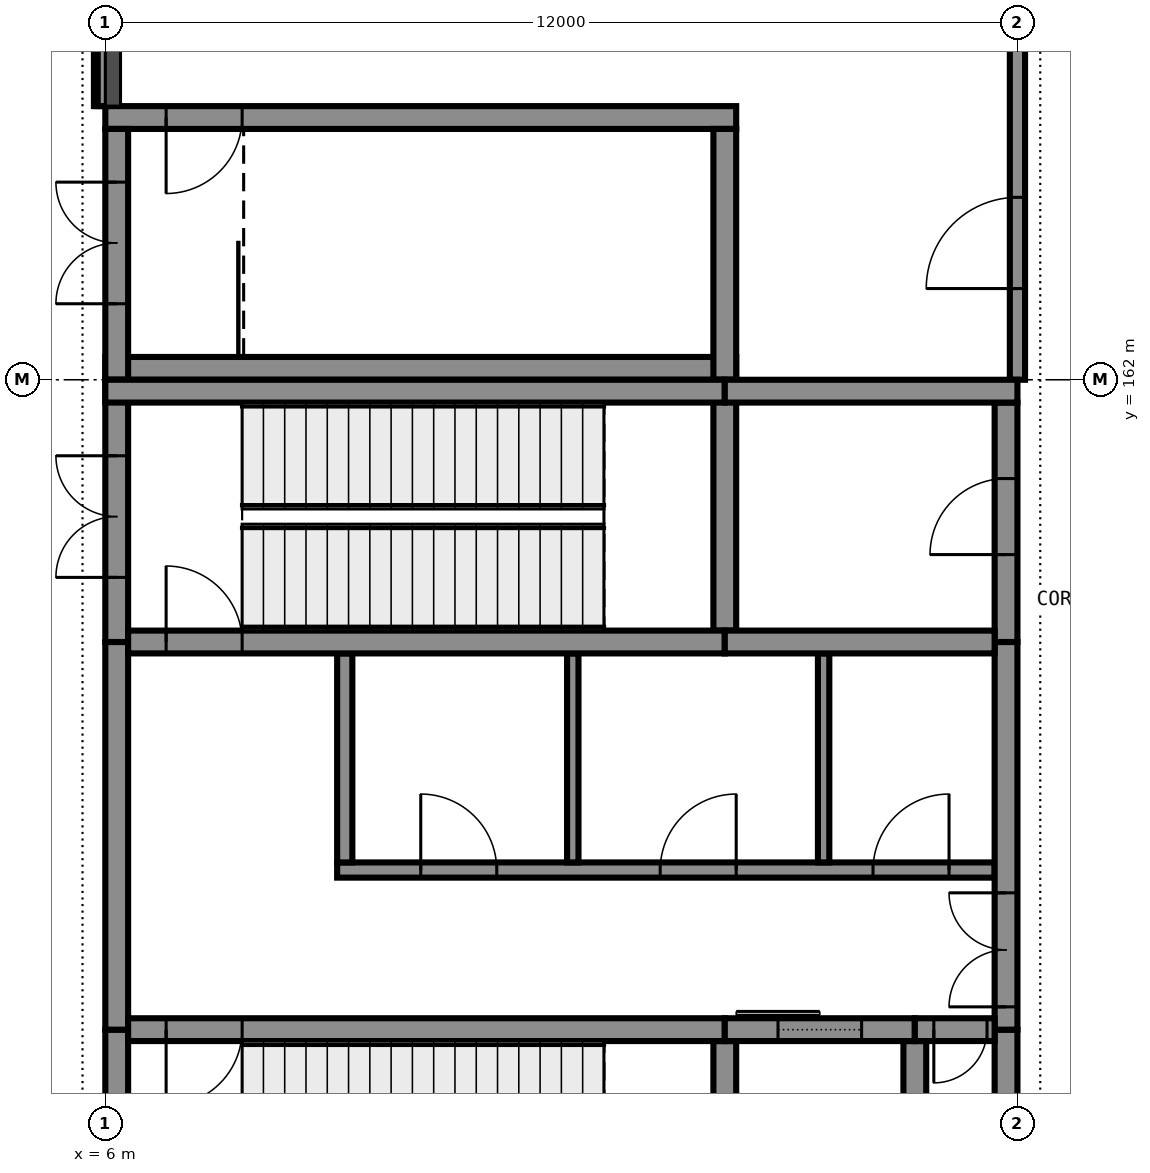
"""IFC4 building model, lengths in metres.
Left out: names, types, materials, properties, quantities, classifications, styles, units other than length and angle.
Written with IfcOpenShell. Run it as: python <this file> out.ifc"""

import sys

from ifc_helpers import new_model, si_unit, direction, frame, frame_2d, origin, place, context, subcontext, project, spatial, rectangle, extrude, element, fill, save


model = new_model("IFC4")
c1 = context("Model", 3, precision=1e-05, world=origin(), true_north=direction((0.0, 1.0)))
c2 = subcontext(c1, "Body", "Model", "MODEL_VIEW")
j1 = project(units=[si_unit("LENGTHUNIT", "METRE"), si_unit("PLANEANGLEUNIT", "RADIAN")], contexts=[c1])
p1 = place(None, origin())
s1 = spatial("IfcSite", under=j1, at=p1, CompositionType="ELEMENT")
p2 = place(p1, origin())
s2 = spatial("IfcBuilding", under=s1, at=p2, CompositionType="ELEMENT")
p3 = place(p2, origin())
s3 = spatial("IfcBuildingStorey", under=s2, at=p3, CompositionType="ELEMENT", Elevation=0.0)
p4 = place(p3, frame((6.0, 162.15, 0.0), z_axis=(0.0, 0.0, 1.0), x_axis=(1.0, 0.0, 0.0)))
e1 = element("IfcWall", 1, at=p4, inside=s3, PredefinedType="SHEAR", context=c2, shape_type="SweptSolid", body=[
    extrude(rectangle(XDim=8.3, YDim=0.3, at=frame_2d((4.15, 0.0))), origin(), (0.0, 0.0, 1.0), 5.75),
])
p5 = place(p3, frame((6.0, 165.45, 0.0), z_axis=(0.0, 0.0, 1.0), x_axis=(1.0, 0.0, 0.0)))
e2 = element("IfcWall", 2, at=p5, inside=s3, PredefinedType="SHEAR", context=c2, shape_type="SweptSolid", body=[
    extrude(rectangle(XDim=8.3, YDim=0.3, at=frame_2d((4.15, 0.0))), origin(), (0.0, 0.0, 1.0), 5.75),
])
p6 = place(p5, frame((0.8, 0.0, 0.0)))
e3 = element("IfcOpeningElement", 3, at=p6, cuts=e2, PredefinedType="OPENING", context=c2, shape_type="SweptSolid", body=[
    extrude(rectangle(XDim=1.0, YDim=2.1, at=frame_2d((0.5, 1.05))), frame((0.0, 0.16, 0.0), z_axis=(0.0, -1.0, 0.0), x_axis=(1.0, 0.0, 0.0)), (0.0, 0.0, 1.0), 0.32),
])
p7 = place(p3, frame((6.15, 162.0, 0.0), z_axis=(0.0, 0.0, 1.0), x_axis=(0.0, 1.0, 0.0)))
e4 = element("IfcWall", 4, at=p7, inside=s3, PredefinedType="SHEAR", context=c2, shape_type="SweptSolid", body=[
    extrude(rectangle(XDim=3.3, YDim=0.3, at=frame_2d((1.65, 0.0))), origin(), (0.0, 0.0, 1.0), 5.75),
])
p8 = place(p7, frame((1.0, 0.0, 0.0)))
e5 = element("IfcOpeningElement", 5, at=p8, cuts=e4, PredefinedType="OPENING", context=c2, shape_type="SweptSolid", body=[
    extrude(rectangle(XDim=1.6, YDim=2.1, at=frame_2d((0.8, 1.05))), frame((0.0, 0.16, 0.0), z_axis=(0.0, -1.0, 0.0), x_axis=(1.0, 0.0, 0.0)), (0.0, 0.0, 1.0), 0.32),
])
p9 = place(p3, frame((14.15, 162.0, 0.0), z_axis=(0.0, 0.0, 1.0), x_axis=(0.0, 1.0, 0.0)))
e6 = element("IfcWall", 6, at=p9, inside=s3, PredefinedType="SHEAR", context=c2, shape_type="SweptSolid", body=[
    extrude(rectangle(XDim=3.3, YDim=0.3, at=frame_2d((1.65, 0.0))), origin(), (0.0, 0.0, 1.0), 5.75),
])
p10 = place(p3, frame((6.0, 161.85, 0.0), z_axis=(0.0, 0.0, 1.0), x_axis=(1.0, 0.0, 0.0)))
e7 = element("IfcWall", 7, at=p10, inside=s3, PredefinedType="SHEAR", context=c2, shape_type="SweptSolid", body=[
    extrude(rectangle(XDim=8.15, YDim=0.3, at=frame_2d((4.075, 0.0))), origin(), (0.0, 0.0, 1.0), 5.75),
])
p11 = place(p3, frame((14.15, 161.85, 0.0), z_axis=(0.0, 0.0, 1.0), x_axis=(1.0, 0.0, 0.0)))
e8 = element("IfcWall", 8, at=p11, inside=s3, PredefinedType="SHEAR", context=c2, shape_type="SweptSolid", body=[
    extrude(rectangle(XDim=3.85, YDim=0.3, at=frame_2d((1.925, 0.0))), origin(), (0.0, 0.0, 1.0), 5.75),
])
p12 = place(p3, frame((6.3, 153.45, 0.0), z_axis=(0.0, 0.0, 1.0), x_axis=(1.0, 0.0, 0.0)))
e9 = element("IfcWall", 9, at=p12, inside=s3, PredefinedType="SHEAR", context=c2, shape_type="SweptSolid", body=[
    extrude(rectangle(XDim=7.85, YDim=0.3, at=frame_2d((3.925, 0.0))), origin(), (0.0, 0.0, 1.0), 5.75),
])
p13 = place(p12, frame((0.5, 0.0, 0.0)))
e10 = element("IfcOpeningElement", 10, at=p13, cuts=e9, PredefinedType="OPENING", context=c2, shape_type="SweptSolid", body=[
    extrude(rectangle(XDim=1.0, YDim=2.1, at=frame_2d((0.5, 1.05))), frame((0.0, 0.16, 0.0), z_axis=(0.0, -1.0, 0.0), x_axis=(1.0, 0.0, 0.0)), (0.0, 0.0, 1.0), 0.32),
])
p14 = place(p3, frame((14.15, 153.45, 0.0), z_axis=(0.0, 0.0, 1.0), x_axis=(1.0, 0.0, 0.0)))
e11 = element("IfcWall", 11, at=p14, inside=s3, PredefinedType="SHEAR", context=c2, shape_type="SweptSolid", body=[
    extrude(rectangle(XDim=2.5, YDim=0.3, at=frame_2d((1.25, 0.0))), origin(), (0.0, 0.0, 1.0), 5.75),
])
p15 = place(p14, frame((0.7, 0.0, 0.0)))
e12 = element("IfcOpeningElement", 12, at=p15, cuts=e11, PredefinedType="OPENING", context=c2, shape_type="SweptSolid", body=[
    extrude(rectangle(XDim=1.1, YDim=2.1, at=frame_2d((0.55, 1.05))), frame((0.0, 0.16, 0.0), z_axis=(0.0, -1.0, 0.0), x_axis=(1.0, 0.0, 0.0)), (0.0, 0.0, 1.0), 0.32),
])
p16 = place(p3, frame((16.65, 153.45, 0.0), z_axis=(0.0, 0.0, 1.0), x_axis=(1.0, 0.0, 0.0)))
e13 = element("IfcWall", 13, at=p16, inside=s3, PredefinedType="SHEAR", context=c2, shape_type="SweptSolid", body=[
    extrude(rectangle(XDim=1.05, YDim=0.3, at=frame_2d((0.525, 0.0))), origin(), (0.0, 0.0, 1.0), 5.75),
])
p17 = place(p16, frame((0.25, 0.0, 0.0)))
e14 = element("IfcOpeningElement", 14, at=p17, cuts=e13, PredefinedType="OPENING", context=c2, shape_type="SweptSolid", body=[
    extrude(rectangle(XDim=0.7, YDim=2.1, at=frame_2d((0.35, 1.05))), frame((0.0, 0.16, 0.0), z_axis=(0.0, -1.0, 0.0), x_axis=(1.0, 0.0, 0.0)), (0.0, 0.0, 1.0), 0.32),
])
p18 = place(p3, frame((6.3, 158.55, 0.0), z_axis=(0.0, 0.0, 1.0), x_axis=(1.0, 0.0, 0.0)))
e15 = element("IfcWall", 15, at=p18, inside=s3, PredefinedType="SHEAR", context=c2, shape_type="SweptSolid", body=[
    extrude(rectangle(XDim=7.85, YDim=0.3, at=frame_2d((3.925, 0.0))), origin(), (0.0, 0.0, 1.0), 5.75),
])
p19 = place(p18, frame((0.5, 0.0, 0.0)))
e16 = element("IfcOpeningElement", 16, at=p19, cuts=e15, PredefinedType="OPENING", context=c2, shape_type="SweptSolid", body=[
    extrude(rectangle(XDim=1.0, YDim=2.1, at=frame_2d((0.5, 1.05))), frame((0.0, 0.16, 0.0), z_axis=(0.0, -1.0, 0.0), x_axis=(1.0, 0.0, 0.0)), (0.0, 0.0, 1.0), 0.32),
])
p20 = place(p3, frame((14.15, 158.55, 0.0), z_axis=(0.0, 0.0, 1.0), x_axis=(1.0, 0.0, 0.0)))
e17 = element("IfcWall", 17, at=p20, inside=s3, PredefinedType="SHEAR", context=c2, shape_type="SweptSolid", body=[
    extrude(rectangle(XDim=3.55, YDim=0.3, at=frame_2d((1.775, 0.0))), origin(), (0.0, 0.0, 1.0), 5.75),
])
p21 = place(p3, frame((6.15, 150.3, 0.0), z_axis=(0.0, 0.0, 1.0), x_axis=(0.0, 1.0, 0.0)))
e18 = element("IfcWall", 18, at=p21, inside=s3, PredefinedType="SHEAR", context=c2, shape_type="SweptSolid", body=[
    extrude(rectangle(XDim=3.15, YDim=0.3, at=frame_2d((1.575, 0.0))), origin(), (0.0, 0.0, 1.0), 5.75),
])
p22 = place(p21, frame((0.65, 0.0, 0.0)))
e19 = element("IfcOpeningElement", 19, at=p22, cuts=e18, PredefinedType="OPENING", context=c2, shape_type="SweptSolid", body=[
    extrude(rectangle(XDim=1.6, YDim=2.1, at=frame_2d((0.8, 1.05))), frame((0.0, 0.16, 0.0), z_axis=(0.0, -1.0, 0.0), x_axis=(1.0, 0.0, 0.0)), (0.0, 0.0, 1.0), 0.32),
])
p23 = place(p3, frame((6.15, 153.45, 0.0), z_axis=(0.0, 0.0, 1.0), x_axis=(0.0, 1.0, 0.0)))
e20 = element("IfcWall", 20, at=p23, inside=s3, PredefinedType="SHEAR", context=c2, shape_type="SweptSolid", body=[
    extrude(rectangle(XDim=5.1, YDim=0.3, at=frame_2d((2.55, 0.0))), origin(), (0.0, 0.0, 1.0), 5.75),
])
p24 = place(p3, frame((6.15, 158.55, 0.0), z_axis=(0.0, 0.0, 1.0), x_axis=(0.0, 1.0, 0.0)))
e21 = element("IfcWall", 21, at=p24, inside=s3, PredefinedType="SHEAR", context=c2, shape_type="SweptSolid", body=[
    extrude(rectangle(XDim=3.45, YDim=0.3, at=frame_2d((1.725, 0.0))), origin(), (0.0, 0.0, 1.0), 5.75),
])
p25 = place(p24, frame((0.85, 0.0, 0.0)))
e22 = element("IfcOpeningElement", 22, at=p25, cuts=e21, PredefinedType="OPENING", context=c2, shape_type="SweptSolid", body=[
    extrude(rectangle(XDim=1.6, YDim=2.1, at=frame_2d((0.8, 1.05))), frame((0.0, 0.16, 0.0), z_axis=(0.0, -1.0, 0.0), x_axis=(1.0, 0.0, 0.0)), (0.0, 0.0, 1.0), 0.32),
])
p26 = place(p3, frame((17.85, 150.3, 0.0), z_axis=(0.0, 0.0, 1.0), x_axis=(0.0, 1.0, 0.0)))
e23 = element("IfcWall", 23, at=p26, inside=s3, PredefinedType="SHEAR", context=c2, shape_type="SweptSolid", body=[
    extrude(rectangle(XDim=3.15, YDim=0.3, at=frame_2d((1.575, 0.0))), origin(), (0.0, 0.0, 1.0), 5.75),
])
p27 = place(p3, frame((17.85, 153.45, 0.0), z_axis=(0.0, 0.0, 1.0), x_axis=(0.0, 1.0, 0.0)))
e24 = element("IfcWall", 24, at=p27, inside=s3, PredefinedType="SHEAR", context=c2, shape_type="SweptSolid", body=[
    extrude(rectangle(XDim=5.1, YDim=0.3, at=frame_2d((2.55, 0.0))), origin(), (0.0, 0.0, 1.0), 5.75),
])
p28 = place(p27, frame((0.3, 0.0, 0.0)))
e25 = element("IfcOpeningElement", 25, at=p28, cuts=e24, PredefinedType="OPENING", context=c2, shape_type="SweptSolid", body=[
    extrude(rectangle(XDim=1.5, YDim=2.1, at=frame_2d((0.75, 1.05))), frame((0.0, 0.16, 0.0), z_axis=(0.0, -1.0, 0.0), x_axis=(1.0, 0.0, 0.0)), (0.0, 0.0, 1.0), 0.32),
])
p29 = place(p3, frame((17.85, 158.55, 0.0), z_axis=(0.0, 0.0, 1.0), x_axis=(0.0, 1.0, 0.0)))
e26 = element("IfcWall", 26, at=p29, inside=s3, PredefinedType="SHEAR", context=c2, shape_type="SweptSolid", body=[
    extrude(rectangle(XDim=3.15, YDim=0.3, at=frame_2d((1.575, 0.0))), origin(), (0.0, 0.0, 1.0), 5.75),
])
p30 = place(p29, frame((1.15, 0.0, 0.0)))
e27 = element("IfcOpeningElement", 27, at=p30, cuts=e26, PredefinedType="OPENING", context=c2, shape_type="SweptSolid", body=[
    extrude(rectangle(XDim=1.0, YDim=2.1, at=frame_2d((0.5, 1.05))), frame((0.0, 0.16, 0.0), z_axis=(0.0, -1.0, 0.0), x_axis=(1.0, 0.0, 0.0)), (0.0, 0.0, 1.0), 0.32),
])
p31 = place(p3, frame((14.15, 150.3, 0.0), z_axis=(0.0, 0.0, 1.0), x_axis=(0.0, 1.0, 0.0)))
e28 = element("IfcWall", 28, at=p31, inside=s3, PredefinedType="SHEAR", context=c2, shape_type="SweptSolid", body=[
    extrude(rectangle(XDim=3.0, YDim=0.3, at=frame_2d((1.5, 0.0))), origin(), (0.0, 0.0, 1.0), 5.75),
])
p32 = place(p3, frame((14.15, 158.7, 0.0), z_axis=(0.0, 0.0, 1.0), x_axis=(0.0, 1.0, 0.0)))
e29 = element("IfcWall", 29, at=p32, inside=s3, PredefinedType="SHEAR", context=c2, shape_type="SweptSolid", body=[
    extrude(rectangle(XDim=3.3, YDim=0.3, at=frame_2d((1.65, 0.0))), origin(), (0.0, 0.0, 1.0), 5.75),
])
p33 = place(p3, frame((16.65, 150.3, 0.0), z_axis=(0.0, 0.0, 1.0), x_axis=(0.0, 1.0, 0.0)))
e30 = element("IfcWall", 30, at=p33, inside=s3, PredefinedType="SHEAR", context=c2, shape_type="SweptSolid", body=[
    extrude(rectangle(XDim=3.0, YDim=0.3, at=frame_2d((1.5, 0.0))), origin(), (0.0, 0.0, 1.0), 5.75),
])
p34 = place(p3, frame((5.925, 173.5, 5.75), z_axis=(0.0, 0.0, 1.0), x_axis=(0.0, -1.0, 0.0)))
e31 = element("IfcWall", 31, at=p34, inside=s3, PredefinedType="STANDARD", context=c2, shape_type="SweptSolid", body=[
    extrude(rectangle(XDim=7.9, YDim=0.15, at=frame_2d((3.95, 0.0))), origin(), (0.0, 0.0, 1.0), 0.25),
])
p35 = place(p3, frame((9.05, 155.55, 0.0), z_axis=(0.0, 0.0, 1.0), x_axis=(1.0, 0.0, 0.0)))
e32 = element("IfcWall", 32, at=p35, inside=s3, PredefinedType="PARTITIONING", context=c2, shape_type="SweptSolid", body=[
    extrude(rectangle(XDim=8.65, YDim=0.2, at=frame_2d((4.325, 0.0))), origin(), (0.0, 0.0, 1.0), 5.75),
])
p36 = place(p35, frame((1.1, 0.0, 0.0)))
e33 = element("IfcOpeningElement", 33, at=p36, cuts=e32, PredefinedType="OPENING", context=c2, shape_type="SweptSolid", body=[
    extrude(rectangle(XDim=1.0, YDim=2.1, at=frame_2d((0.5, 1.05))), frame((0.0, 0.11, 0.0), z_axis=(0.0, -1.0, 0.0), x_axis=(1.0, 0.0, 0.0)), (0.0, 0.0, 1.0), 0.22),
])
p37 = place(p35, frame((4.25, 0.0, 0.0)))
e34 = element("IfcOpeningElement", 34, at=p37, cuts=e32, PredefinedType="OPENING", context=c2, shape_type="SweptSolid", body=[
    extrude(rectangle(XDim=1.0, YDim=2.1, at=frame_2d((0.5, 1.05))), frame((0.0, 0.11, 0.0), z_axis=(0.0, -1.0, 0.0), x_axis=(1.0, 0.0, 0.0)), (0.0, 0.0, 1.0), 0.22),
])
p38 = place(p35, frame((7.05, 0.0, 0.0)))
e35 = element("IfcOpeningElement", 35, at=p38, cuts=e32, PredefinedType="OPENING", context=c2, shape_type="SweptSolid", body=[
    extrude(rectangle(XDim=1.0, YDim=2.1, at=frame_2d((0.5, 1.05))), frame((0.0, 0.11, 0.0), z_axis=(0.0, -1.0, 0.0), x_axis=(1.0, 0.0, 0.0)), (0.0, 0.0, 1.0), 0.22),
])
p39 = place(p3, frame((6.0, 165.6, 0.0), z_axis=(0.0, 0.0, 1.0), x_axis=(0.0, 1.0, 0.0)))
e36 = element("IfcWall", 36, at=p39, inside=s3, PredefinedType="PARTITIONING", context=c2, shape_type="SweptSolid", body=[
    extrude(rectangle(XDim=2.3, YDim=0.2, at=frame_2d((1.15, 0.0))), origin(), (0.0, 0.0, 1.0), 4.75),
])
p40 = place(p3, frame((9.15, 155.65, 0.0), z_axis=(0.0, 0.0, 1.0), x_axis=(0.0, 1.0, 0.0)))
e37 = element("IfcWall", 37, at=p40, inside=s3, PredefinedType="PARTITIONING", context=c2, shape_type="SweptSolid", body=[
    extrude(rectangle(XDim=2.75, YDim=0.2, at=frame_2d((1.375, 0.0))), origin(), (0.0, 0.0, 1.0), 5.75),
])
for number, where, z_axis, x_axis in (
    (38, (12.15, 155.65, 0.0), (0.0, 0.0, 1.0), (0.0, 1.0, 0.0)),
    (39, (15.45, 155.65, 0.0), (0.0, 0.0, 1.0), (0.0, 1.0, 0.0)),
):
    element("IfcWall", number, at=place(p3, frame(where, z_axis=z_axis, x_axis=x_axis)), inside=s3, PredefinedType="PARTITIONING", context=c2, shape_type="SweptSolid", body=[
        extrude(rectangle(XDim=2.75, YDim=0.15, at=frame_2d((1.375, 0.0))), origin(), (0.0, 0.0, 1.0), 5.75),
    ])
p41 = place(p3, frame((18.0, 162.0, 0.0), z_axis=(0.0, 0.0, 1.0), x_axis=(0.0, 1.0, 0.0)))
e40 = element("IfcWall", 40, at=p41, inside=s3, PredefinedType="PARTITIONING", context=c2, shape_type="SweptSolid", body=[
    extrude(rectangle(XDim=35.9, YDim=0.2, at=frame_2d((17.95, 0.0))), origin(), (0.0, 0.0, 1.0), 4.75),
])
p42 = place(p41, frame((1.2, 0.0, 0.0)))
e41 = element("IfcOpeningElement", 41, at=p42, cuts=e40, PredefinedType="OPENING", context=c2, shape_type="SweptSolid", body=[
    extrude(rectangle(XDim=1.2, YDim=2.1, at=frame_2d((0.6, 1.05))), frame((0.0, 0.11, 0.0), z_axis=(0.0, -1.0, 0.0), x_axis=(1.0, 0.0, 0.0)), (0.0, 0.0, 1.0), 0.22),
])
p43 = place(p41, frame((12.9, 0.0, 0.0)))
e42 = element("IfcOpeningElement", 42, at=p43, cuts=e40, PredefinedType="OPENING", context=c2, shape_type="SweptSolid", body=[
    extrude(rectangle(XDim=1.2, YDim=2.1, at=frame_2d((0.6, 1.05))), frame((0.0, 0.11, 0.0), z_axis=(0.0, -1.0, 0.0), x_axis=(1.0, 0.0, 0.0)), (0.0, 0.0, 1.0), 0.22),
])
p44 = place(p41, frame((19.2, 0.0, 0.0)))
e43 = element("IfcOpeningElement", 43, at=p44, cuts=e40, PredefinedType="OPENING", context=c2, shape_type="SweptSolid", body=[
    extrude(rectangle(XDim=1.2, YDim=2.1, at=frame_2d((0.6, 1.05))), frame((0.0, 0.11, 0.0), z_axis=(0.0, -1.0, 0.0), x_axis=(1.0, 0.0, 0.0)), (0.0, 0.0, 1.0), 0.22),
])
p45 = place(p41, frame((29.4, 0.0, 0.0)))
e44 = element("IfcOpeningElement", 44, at=p45, cuts=e40, PredefinedType="OPENING", context=c2, shape_type="SweptSolid", body=[
    extrude(rectangle(XDim=1.2, YDim=2.1, at=frame_2d((0.6, 1.05))), frame((0.0, 0.11, 0.0), z_axis=(0.0, -1.0, 0.0), x_axis=(1.0, 0.0, 0.0)), (0.0, 0.0, 1.0), 0.22),
])
p46 = place(p13, frame((1.0, 0.0, 0.0), z_axis=(0.0, 0.0, 1.0), x_axis=(-1.0, 0.0, 0.0)))
e45 = element("IfcDoor", 45, at=p46, inside=s3, OperationType="SINGLE_SWING_LEFT", PredefinedType="DOOR", context=c2, shape_type="SweptSolid", body=[
    extrude(rectangle(XDim=1.0, YDim=2.1, at=frame_2d((0.5, 1.05))), frame((0.0, 0.025, 0.0), z_axis=(0.0, -1.0, 0.0), x_axis=(1.0, 0.0, 0.0)), (0.0, 0.0, 1.0), 0.05),
])
fill(e10, e45)
p47 = place(p15, origin())
e46 = element("IfcDoor", 46, at=p47, inside=s3, OperationType="SLIDING_TO_LEFT", PredefinedType="DOOR", context=c2, shape_type="SweptSolid", body=[
    extrude(rectangle(XDim=1.1, YDim=2.1, at=frame_2d((0.55, 1.05))), frame((0.0, 0.025, 0.0), z_axis=(0.0, -1.0, 0.0), x_axis=(1.0, 0.0, 0.0)), (0.0, 0.0, 1.0), 0.05),
])
fill(e12, e46)
p48 = place(p17, frame((0.7, 0.0, 0.0), z_axis=(0.0, 0.0, 1.0), x_axis=(-1.0, 0.0, 0.0)))
e47 = element("IfcDoor", 47, at=p48, inside=s3, OperationType="SINGLE_SWING_LEFT", PredefinedType="DOOR", context=c2, shape_type="SweptSolid", body=[
    extrude(rectangle(XDim=0.7, YDim=2.1, at=frame_2d((0.35, 1.05))), frame((0.0, 0.025, 0.0), z_axis=(0.0, -1.0, 0.0), x_axis=(1.0, 0.0, 0.0)), (0.0, 0.0, 1.0), 0.05),
])
fill(e14, e47)
p49 = place(p28, origin())
e48 = element("IfcDoor", 48, at=p49, inside=s3, OperationType="DOUBLE_DOOR_SINGLE_SWING", PredefinedType="DOOR", context=c2, shape_type="SweptSolid", body=[
    extrude(rectangle(XDim=1.5, YDim=2.1, at=frame_2d((0.75, 1.05))), frame((0.0, 0.025, 0.0), z_axis=(0.0, -1.0, 0.0), x_axis=(1.0, 0.0, 0.0)), (0.0, 0.0, 1.0), 0.05),
])
fill(e25, e48)
p50 = place(p36, origin())
e49 = element("IfcDoor", 49, at=p50, inside=s3, OperationType="SINGLE_SWING_RIGHT", PredefinedType="DOOR", context=c2, shape_type="SweptSolid", body=[
    extrude(rectangle(XDim=1.0, YDim=2.1, at=frame_2d((0.5, 1.05))), frame((0.0, 0.025, 0.0), z_axis=(0.0, -1.0, 0.0), x_axis=(1.0, 0.0, 0.0)), (0.0, 0.0, 1.0), 0.05),
])
fill(e33, e49)
p51 = place(p37, origin())
e50 = element("IfcDoor", 50, at=p51, inside=s3, OperationType="SINGLE_SWING_LEFT", PredefinedType="DOOR", context=c2, shape_type="SweptSolid", body=[
    extrude(rectangle(XDim=1.0, YDim=2.1, at=frame_2d((0.5, 1.05))), frame((0.0, 0.025, 0.0), z_axis=(0.0, -1.0, 0.0), x_axis=(1.0, 0.0, 0.0)), (0.0, 0.0, 1.0), 0.05),
])
fill(e34, e50)
p52 = place(p38, origin())
e51 = element("IfcDoor", 51, at=p52, inside=s3, OperationType="SINGLE_SWING_LEFT", PredefinedType="DOOR", context=c2, shape_type="SweptSolid", body=[
    extrude(rectangle(XDim=1.0, YDim=2.1, at=frame_2d((0.5, 1.05))), frame((0.0, 0.025, 0.0), z_axis=(0.0, -1.0, 0.0), x_axis=(1.0, 0.0, 0.0)), (0.0, 0.0, 1.0), 0.05),
])
fill(e35, e51)
p53 = place(p19, origin())
e52 = element("IfcDoor", 52, at=p53, inside=s3, OperationType="SINGLE_SWING_RIGHT", PredefinedType="DOOR", context=c2, shape_type="SweptSolid", body=[
    extrude(rectangle(XDim=1.0, YDim=2.1, at=frame_2d((0.5, 1.05))), frame((0.0, 0.025, 0.0), z_axis=(0.0, -1.0, 0.0), x_axis=(1.0, 0.0, 0.0)), (0.0, 0.0, 1.0), 0.05),
])
fill(e16, e52)
p54 = place(p25, origin())
e53 = element("IfcDoor", 53, at=p54, inside=s3, OperationType="DOUBLE_DOOR_SINGLE_SWING", PredefinedType="DOOR", context=c2, shape_type="SweptSolid", body=[
    extrude(rectangle(XDim=1.6, YDim=2.1, at=frame_2d((0.8, 1.05))), frame((0.0, 0.025, 0.0), z_axis=(0.0, -1.0, 0.0), x_axis=(1.0, 0.0, 0.0)), (0.0, 0.0, 1.0), 0.05),
])
fill(e22, e53)
p55 = place(p30, origin())
e54 = element("IfcDoor", 54, at=p55, inside=s3, OperationType="SINGLE_SWING_RIGHT", PredefinedType="DOOR", context=c2, shape_type="SweptSolid", body=[
    extrude(rectangle(XDim=1.0, YDim=2.1, at=frame_2d((0.5, 1.05))), frame((0.0, 0.025, 0.0), z_axis=(0.0, -1.0, 0.0), x_axis=(1.0, 0.0, 0.0)), (0.0, 0.0, 1.0), 0.05),
])
fill(e27, e54)
p56 = place(p8, origin())
e55 = element("IfcDoor", 55, at=p56, inside=s3, OperationType="DOUBLE_DOOR_SINGLE_SWING", PredefinedType="DOOR", context=c2, shape_type="SweptSolid", body=[
    extrude(rectangle(XDim=1.6, YDim=2.1, at=frame_2d((0.8, 1.05))), frame((0.0, 0.025, 0.0), z_axis=(0.0, -1.0, 0.0), x_axis=(1.0, 0.0, 0.0)), (0.0, 0.0, 1.0), 0.05),
])
fill(e5, e55)
p57 = place(p42, origin())
e56 = element("IfcDoor", 56, at=p57, inside=s3, OperationType="SINGLE_SWING_RIGHT", PredefinedType="DOOR", context=c2, shape_type="SweptSolid", body=[
    extrude(rectangle(XDim=1.2, YDim=2.1, at=frame_2d((0.6, 1.05))), frame((0.0, 0.025, 0.0), z_axis=(0.0, -1.0, 0.0), x_axis=(1.0, 0.0, 0.0)), (0.0, 0.0, 1.0), 0.05),
])
fill(e41, e56)
p58 = place(p6, frame((1.0, 0.0, 0.0), z_axis=(0.0, 0.0, 1.0), x_axis=(-1.0, 0.0, 0.0)))
e57 = element("IfcDoor", 57, at=p58, inside=s3, OperationType="SINGLE_SWING_LEFT", PredefinedType="DOOR", context=c2, shape_type="SweptSolid", body=[
    extrude(rectangle(XDim=1.0, YDim=2.1, at=frame_2d((0.5, 1.05))), frame((0.0, 0.025, 0.0), z_axis=(0.0, -1.0, 0.0), x_axis=(1.0, 0.0, 0.0)), (0.0, 0.0, 1.0), 0.05),
])
fill(e3, e57)
save(model, sys.argv[1])
